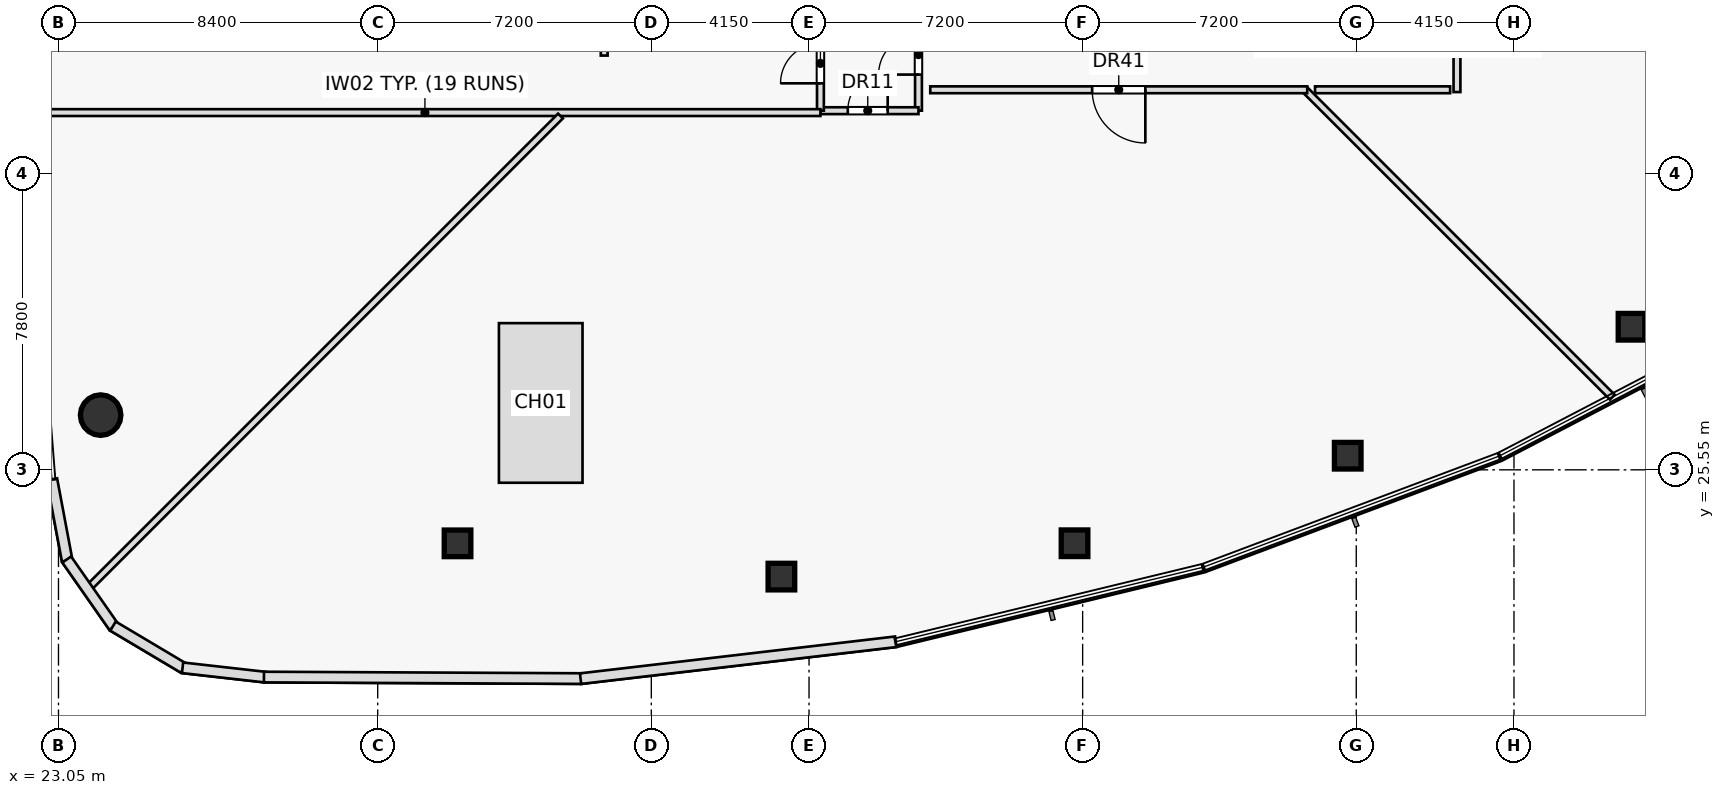
"""IFC4 building model, lengths in metres.
Left out: names, types, materials, properties, quantities, classifications, styles, units other than length and angle.
Written with IfcOpenShell. Run it as: python <this file> out.ifc"""

import sys

from ifc_helpers import new_model, si_unit, direction, frame, frame_2d, origin, origin_2d, place, context, subcontext, project, spatial, rectangle, hollow_rectangle, hollow_circle, extrude, element, fill, save


model = new_model("IFC4")
c1 = context("Model", 3, precision=1e-05, world=origin(), true_north=direction((0.0, 1.0)))
c2 = subcontext(c1, "Body", "Model", "MODEL_VIEW")
j1 = project(units=[si_unit("LENGTHUNIT", "METRE"), si_unit("PLANEANGLEUNIT", "RADIAN")], contexts=[c1])
p1 = place(None, origin())
s1 = spatial("IfcSite", under=j1, at=p1, CompositionType="ELEMENT")
p2 = place(p1, origin())
s2 = spatial("IfcBuilding", under=s1, at=p2, CompositionType="ELEMENT")
p3 = place(p2, frame((0.0, 0.0, 97.8)))
s3 = spatial("IfcBuildingStorey", under=s2, at=p3, CompositionType="ELEMENT", Elevation=97.8)
p4 = place(p3, frame((24.159, 26.99, 0.0), z_axis=(0.0, 0.0, 1.0), x_axis=(1.0, 0.0, 0.0)))
e1 = element("IfcColumn", 1, at=p4, inside=s3, PredefinedType="COLUMN", context=c2, shape_type="SweptSolid", body=[
    extrude(hollow_circle(Radius=0.533, WallThickness=0.045, at=origin_2d()), origin(), (0.0, 0.0, 1.0), 5.0),
])
for number, where, z_axis, x_axis in (
    (2, (33.551, 23.615, 0.0), (0.0, 0.0, 1.0), (1.0, 0.0, 0.0)),
    (3, (42.073, 22.74, 0.0), (0.0, 0.0, 1.0), (1.0, 0.0, 0.0)),
    (4, (49.787, 23.618, 0.0), (0.0, 0.0, 1.0), (1.0, 0.0, 0.0)),
    (5, (56.975, 25.921, 0.0), (0.0, 0.0, 1.0), (1.0, 0.0, 0.0)),
    (6, (64.444, 29.315, 0.0), (0.0, 0.0, 1.0), (1.0, 0.0, 0.0)),
):
    element("IfcColumn", number, at=place(p3, frame(where, z_axis=z_axis, x_axis=x_axis)), inside=s3, PredefinedType="COLUMN", context=c2, shape_type="SweptSolid", body=[
        extrude(hollow_rectangle(XDim=0.7, YDim=0.7, WallThickness=0.04, at=origin_2d()), origin(), (0.0, 0.0, 1.0), 4.55),
    ])
p5 = place(p3, frame((45.68, 35.0, 0.0), z_axis=(0.0, 0.0, 1.0), x_axis=(0.0, 1.0, 0.0)))
e7 = element("IfcWall", 7, at=p5, inside=s3, PredefinedType="PARTITIONING", context=c2, shape_type="SweptSolid", body=[
    extrude(rectangle(XDim=3.2, YDim=0.18, at=frame_2d((1.6, 0.0))), origin(), (0.0, 0.0, 1.0), 4.55),
])
p6 = place(p5, frame((0.95, 0.0, 0.0)))
e8 = element("IfcOpeningElement", 8, at=p6, cuts=e7, PredefinedType="OPENING", context=c2, shape_type="SweptSolid", body=[
    extrude(rectangle(XDim=1.05, YDim=2.2, at=frame_2d((0.525, 1.1))), frame((0.0, 0.1, 0.0), z_axis=(0.0, -1.0, 0.0), x_axis=(1.0, 0.0, 0.0)), (0.0, 0.0, 1.0), 0.2),
])
p7 = place(p3, frame((43.1, 35.0, 0.0), z_axis=(0.0, 0.0, 1.0), x_axis=(1.0, 0.0, 0.0)))
e9 = element("IfcWall", 9, at=p7, inside=s3, PredefinedType="PARTITIONING", context=c2, shape_type="SweptSolid", body=[
    extrude(rectangle(XDim=2.58, YDim=0.18, at=frame_2d((1.29, 0.0))), origin(), (0.0, 0.0, 1.0), 3.925),
])
p8 = place(p7, frame((0.72, 0.0, 0.0)))
e10 = element("IfcOpeningElement", 10, at=p8, cuts=e9, PredefinedType="OPENING", context=c2, shape_type="SweptSolid", body=[
    extrude(rectangle(XDim=1.05, YDim=2.2, at=frame_2d((0.525, 1.1))), frame((0.0, 0.1, 0.0), z_axis=(0.0, -1.0, 0.0), x_axis=(1.0, 0.0, 0.0)), (0.0, 0.0, 1.0), 0.2),
])
p9 = place(p3, frame((43.1, 35.0, 0.0), z_axis=(0.0, 0.0, 1.0), x_axis=(0.0, 1.0, 0.0)))
e11 = element("IfcWall", 11, at=p9, inside=s3, PredefinedType="PARTITIONING", context=c2, shape_type="SweptSolid", body=[
    extrude(rectangle(XDim=3.2, YDim=0.18, at=frame_2d((1.6, 0.0))), origin(), (0.0, 0.0, 1.0), 3.925),
])
p10 = place(p9, frame((0.72, 0.0, 0.0)))
e12 = element("IfcOpeningElement", 12, at=p10, cuts=e11, PredefinedType="OPENING", context=c2, shape_type="SweptSolid", body=[
    extrude(rectangle(XDim=1.05, YDim=2.2, at=frame_2d((0.525, 1.1))), frame((0.0, 0.1, 0.0), z_axis=(0.0, -1.0, 0.0), x_axis=(1.0, 0.0, 0.0)), (0.0, 0.0, 1.0), 0.2),
])
p11 = place(p3, frame((22.285, 34.95, 0.0), z_axis=(0.0, 0.0, 1.0), x_axis=(1.0, 0.0, 0.0)))
e13 = element("IfcWall", 13, at=p11, inside=s3, PredefinedType="PARTITIONING", context=c2, shape_type="SweptSolid", body=[
    extrude(rectangle(XDim=20.815, YDim=0.18, at=frame_2d((10.407, 0.0))), origin(), (0.0, 0.0, 1.0), 3.925),
])
p12 = place(p3, frame((37.41, 36.45, 0.0), z_axis=(0.0, 0.0, 1.0), x_axis=(0.0, 1.0, 0.0)))
e14 = element("IfcWall", 14, at=p12, inside=s3, PredefinedType="PARTITIONING", context=c2, shape_type="SweptSolid", body=[
    extrude(rectangle(XDim=12.05, YDim=0.18, at=frame_2d((6.025, 0.0))), origin(), (0.0, 0.0, 1.0), 3.925),
])
p13 = place(p3, frame((36.26, 34.86, 0.0), z_axis=(0.0, 0.0, 1.0), x_axis=(-0.707106781187, -0.707106781187, 0.0)))
e15 = element("IfcWall", 15, at=p13, inside=s3, PredefinedType="PARTITIONING", context=c2, shape_type="SweptSolid", body=[
    extrude(rectangle(XDim=17.605, YDim=0.18, at=frame_2d((8.802, 0.0))), origin(), (0.0, 0.0, 1.0), 3.925),
])
p14 = place(p3, frame((55.85, 35.55, 0.0), z_axis=(0.0, 0.0, 1.0), x_axis=(0.707096109246, -0.707117452966, 0.0)))
e16 = element("IfcWall", 16, at=p14, inside=s3, PredefinedType="PARTITIONING", context=c2, shape_type="SweptSolid", body=[
    extrude(rectangle(XDim=11.438, YDim=0.18, at=frame_2d((5.719, 0.0))), origin(), (0.0, 0.0, 1.0), 3.925),
])
p15 = place(p3, frame((59.85, 54.478, 0.0), z_axis=(0.0, 0.0, 1.0), x_axis=(0.0, -1.0, 0.0)))
e17 = element("IfcWall", 17, at=p15, inside=s3, PredefinedType="PARTITIONING", context=c2, shape_type="SweptSolid", body=[
    extrude(rectangle(XDim=18.988, YDim=0.18, at=frame_2d((9.494, 0.0))), origin(), (0.0, 0.0, 1.0), 3.925),
])
p16 = place(p15, frame((8.794, 0.0, 0.0)))
e18 = element("IfcOpeningElement", 18, at=p16, cuts=e17, PredefinedType="OPENING", context=c2, shape_type="SweptSolid", body=[
    extrude(rectangle(XDim=1.4, YDim=2.15, at=frame_2d((0.7, 1.075))), frame((0.0, 0.1, 0.0), z_axis=(0.0, -1.0, 0.0), x_axis=(1.0, 0.0, 0.0)), (0.0, 0.0, 1.0), 0.2),
])
p17 = place(p3, frame((59.67, 35.55, 0.0), z_axis=(0.0, 0.0, 1.0), x_axis=(-1.0, 0.0, 0.0)))
e19 = element("IfcWall", 19, at=p17, inside=s3, PredefinedType="PARTITIONING", context=c2, shape_type="SweptSolid", body=[
    extrude(rectangle(XDim=3.555, YDim=0.18, at=frame_2d((1.777, 0.0))), origin(), (0.0, 0.0, 1.0), 3.925),
])
p18 = place(p3, frame((55.91, 35.55, 0.0), z_axis=(0.0, 0.0, 1.0), x_axis=(-1.0, 0.0, 0.0)))
e20 = element("IfcWall", 20, at=p18, inside=s3, PredefinedType="PARTITIONING", context=c2, shape_type="SweptSolid", body=[
    extrude(rectangle(XDim=9.92, YDim=0.18, at=frame_2d((4.96, 0.0))), origin(), (0.0, 0.0, 1.0), 4.55),
])
p19 = place(p18, frame((4.26, 0.0, 0.0)))
e21 = element("IfcOpeningElement", 21, at=p19, cuts=e20, PredefinedType="OPENING", context=c2, shape_type="SweptSolid", body=[
    extrude(rectangle(XDim=1.4, YDim=2.15, at=frame_2d((0.7, 1.075))), frame((0.0, 0.1, 0.0), z_axis=(0.0, -1.0, 0.0), x_axis=(1.0, 0.0, 0.0)), (0.0, 0.0, 1.0), 0.2),
])
p20 = place(p3, frame((22.877, 25.3, 0.0), z_axis=(0.0, 0.0, 1.0), x_axis=(0.184830893435, -0.982770339821, 0.0)))
e22 = element("IfcWall", 22, at=p20, inside=s3, PredefinedType="STANDARD", context=c2, shape_type="SweptSolid", body=[
    extrude(rectangle(XDim=2.174, YDim=0.28, at=frame_2d((1.087, 0.0))), origin(), (0.0, 0.0, 1.0), 4.55),
])
for number, where, z_axis, x_axis in (
    (23, (23.267, 23.19, 0.0), (0.0, 0.0, 1.0), (0.573, -0.82, 0.0)),
    (24, (24.485, 21.438, 0.0), (0.0, 0.0, 1.0), (0.859, -0.511, 0.0)),
):
    element("IfcWall", number, at=place(p3, frame(where, z_axis=z_axis, x_axis=x_axis)), inside=s3, PredefinedType="STANDARD", context=c2, shape_type="SweptSolid", body=[
        extrude(rectangle(XDim=2.163, YDim=0.28, at=frame_2d((1.081, 0.0))), origin(), (0.0, 0.0, 1.0), 4.55),
    ])
p21 = place(p3, frame((26.315, 20.341, 0.0), z_axis=(0.0, 0.0, 1.0), x_axis=(0.993663802202, -0.112393274681, 0.0)))
e25 = element("IfcWall", 25, at=p21, inside=s3, PredefinedType="STANDARD", context=c2, shape_type="SweptSolid", body=[
    extrude(rectangle(XDim=2.185, YDim=0.28, at=frame_2d((1.093, 0.0))), origin(), (0.0, 0.0, 1.0), 4.55),
])
p22 = place(p3, frame((28.457, 20.097, 0.0), z_axis=(0.0, 0.0, 1.0), x_axis=(0.99998839325, -0.004818025021, 0.0)))
e26 = element("IfcWall", 26, at=p22, inside=s3, PredefinedType="STANDARD", context=c2, shape_type="SweptSolid", body=[
    extrude(rectangle(XDim=8.361, YDim=0.28, at=frame_2d((4.18, 0.0))), origin(), (0.0, 0.0, 1.0), 4.55),
])
p23 = place(p3, frame((36.788, 20.055, 0.0), z_axis=(0.0, 0.0, 1.0), x_axis=(0.993221677421, 0.116235534586, 0.0)))
e27 = element("IfcWall", 27, at=p23, inside=s3, PredefinedType="STANDARD", context=c2, shape_type="SweptSolid", body=[
    extrude(rectangle(XDim=8.349, YDim=0.28, at=frame_2d((4.175, 0.0))), origin(), (0.0, 0.0, 1.0), 4.55),
])
p24 = place(p6, origin())
e28 = element("IfcDoor", 28, at=p24, inside=s3, OperationType="SINGLE_SWING_LEFT", PredefinedType="DOOR", context=c2, shape_type="SweptSolid", body=[
    extrude(rectangle(XDim=1.05, YDim=2.2, at=frame_2d((0.525, 1.1))), frame((0.0, 0.025, 0.0), z_axis=(0.0, -1.0, 0.0), x_axis=(1.0, 0.0, 0.0)), (0.0, 0.0, 1.0), 0.05),
])
fill(e8, e28)
p25 = place(p8, origin())
e29 = element("IfcDoor", 29, at=p25, inside=s3, OperationType="SINGLE_SWING_RIGHT", PredefinedType="DOOR", context=c2, shape_type="SweptSolid", body=[
    extrude(rectangle(XDim=1.05, YDim=2.2, at=frame_2d((0.525, 1.1))), frame((0.0, 0.025, 0.0), z_axis=(0.0, -1.0, 0.0), x_axis=(1.0, 0.0, 0.0)), (0.0, 0.0, 1.0), 0.05),
])
fill(e10, e29)
p26 = place(p10, origin())
e30 = element("IfcDoor", 30, at=p26, inside=s3, OperationType="SINGLE_SWING_LEFT", PredefinedType="DOOR", context=c2, shape_type="SweptSolid", body=[
    extrude(rectangle(XDim=1.05, YDim=2.2, at=frame_2d((0.525, 1.1))), frame((0.0, 0.025, 0.0), z_axis=(0.0, -1.0, 0.0), x_axis=(1.0, 0.0, 0.0)), (0.0, 0.0, 1.0), 0.05),
])
fill(e12, e30)
p27 = place(p19, origin())
e31 = element("IfcDoor", 31, at=p27, inside=s3, OperationType="SINGLE_SWING_LEFT", PredefinedType="DOOR", context=c2, shape_type="SweptSolid", body=[
    extrude(rectangle(XDim=1.4, YDim=2.15, at=frame_2d((0.7, 1.075))), frame((0.0, 0.025, 0.0), z_axis=(0.0, -1.0, 0.0), x_axis=(1.0, 0.0, 0.0)), (0.0, 0.0, 1.0), 0.05),
])
fill(e21, e31)
save(model, sys.argv[1])
